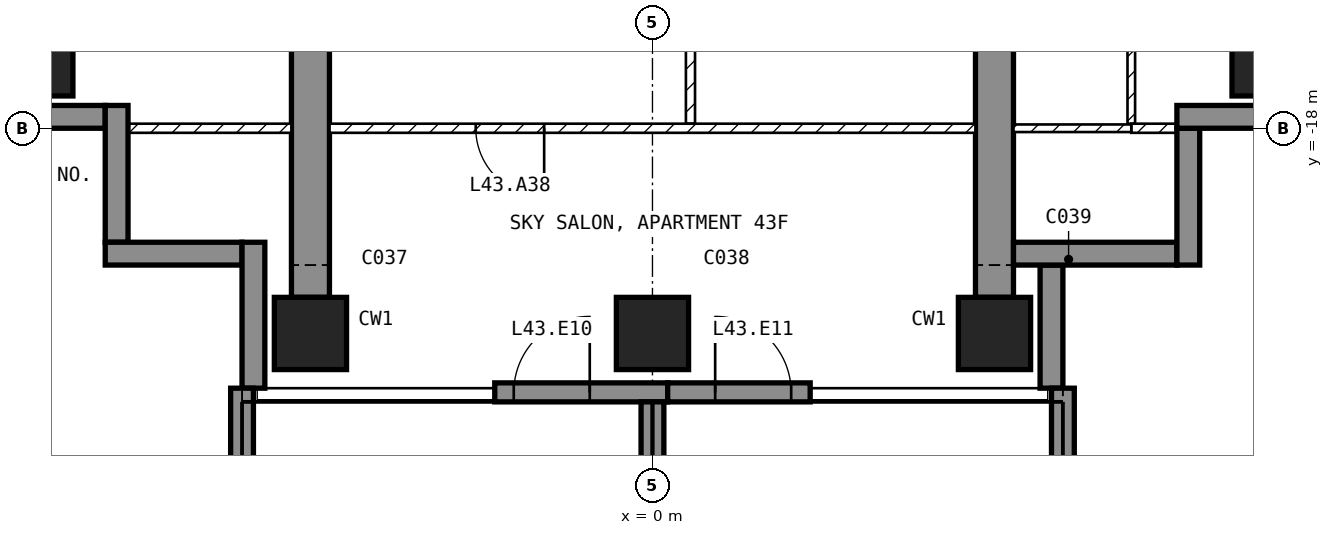
"""IFC4 building model, lengths in metres.
Left out: names, types, materials, properties, quantities, classifications, styles, units other than length and angle.
Written with IfcOpenShell. Run it as: python <this file> out.ifc"""

import sys

from ifc_helpers import new_model, si_unit, direction, frame, frame_2d, origin, origin_2d, place, context, subcontext, project, spatial, polyline, rectangle, outline, extrude, element, fill, save


model = new_model("IFC4")
c1 = context("Model", 3, precision=1e-05, world=origin(), true_north=direction((0.0, 1.0)))
c2 = subcontext(c1, "Body", "Model", "MODEL_VIEW")
j1 = project(units=[si_unit("LENGTHUNIT", "METRE"), si_unit("PLANEANGLEUNIT", "RADIAN")], contexts=[c1])
p1 = place(None, origin())
s1 = spatial("IfcSite", under=j1, at=p1, CompositionType="ELEMENT")
p2 = place(p1, origin())
s2 = spatial("IfcBuilding", under=s1, at=p2, CompositionType="ELEMENT")
p3 = place(p2, frame((0.0, 0.0, 177.1)))
s3 = spatial("IfcBuildingStorey", under=s2, at=p3, CompositionType="ELEMENT", Elevation=177.1)
for number, where, z_axis, x_axis in (
    (1, (-8.1, -17.1, -0.25), (0.0, 0.0, 1.0), (1.0, 0.0, 0.0)),
    (2, (-4.5, -20.7, -0.25), (0.0, 0.0, 1.0), (1.0, 0.0, 0.0)),
    (3, (0.0, -20.7, -0.25), (0.0, 0.0, 1.0), (1.0, 0.0, 0.0)),
    (4, (4.5, -20.7, -0.25), (0.0, 0.0, 1.0), (1.0, 0.0, 0.0)),
    (5, (8.1, -17.1, -0.25), (0.0, 0.0, 1.0), (1.0, 0.0, 0.0)),
):
    element("IfcColumn", number, at=place(p3, frame(where, z_axis=z_axis, x_axis=x_axis)), inside=s3, PredefinedType="COLUMN", context=c2, shape_type="SweptSolid", body=[
        extrude(rectangle(XDim=0.95, YDim=0.95, at=origin_2d()), origin(), (0.0, 0.0, 1.0), 3.5),
    ])
for number, where, z_axis, x_axis in (
    (6, (-4.75, -20.225, -0.25), (1.0, 0.0, 0.0), (0.0, 1.0, 0.0)),
    (7, (4.25, -20.225, -0.25), (1.0, 0.0, 0.0), (0.0, 1.0, 0.0)),
):
    element("IfcWall", number, at=place(p3, frame(where, z_axis=z_axis, x_axis=x_axis)), inside=s3, PredefinedType="SHEAR", context=c2, shape_type="SweptSolid", body=[
        extrude(outline(polyline([(0.0, 0.0), (6.725, 0.0), (6.725, 2.65), (9.125, 2.65), (9.125, 0.0), (11.225, 0.0), (11.225, 3.5), (0.0, 3.5), (0.0, 0.0)])), origin(), (0.0, 0.0, 1.0), 0.5),
    ])
p4 = place(p3, frame((-2.075, -21.475, 0.0), z_axis=(0.0, 0.0, 1.0), x_axis=(1.0, 0.0, 0.0)))
e8 = element("IfcWall", 8, at=p4, inside=s3, PredefinedType="SOLIDWALL", context=c2, shape_type="SweptSolid", body=[
    extrude(rectangle(XDim=2.275, YDim=0.25, at=frame_2d((1.137, 0.0))), origin(), (0.0, 0.0, 1.0), 3.25),
])
p5 = place(p4, frame((0.25, 0.0, 0.0)))
e9 = element("IfcOpeningElement", 9, at=p5, cuts=e8, PredefinedType="OPENING", context=c2, shape_type="SweptSolid", body=[
    extrude(rectangle(XDim=1.0, YDim=2.4, at=frame_2d((0.5, 1.2))), frame((0.0, 0.135, 0.0), z_axis=(0.0, -1.0, 0.0), x_axis=(1.0, 0.0, 0.0)), (0.0, 0.0, 1.0), 0.27),
])
p6 = place(p3, frame((0.2, -21.475, 0.0), z_axis=(0.0, 0.0, 1.0), x_axis=(1.0, 0.0, 0.0)))
e10 = element("IfcWall", 10, at=p6, inside=s3, PredefinedType="SOLIDWALL", context=c2, shape_type="SweptSolid", body=[
    extrude(rectangle(XDim=1.875, YDim=0.25, at=frame_2d((0.938, 0.0))), origin(), (0.0, 0.0, 1.0), 3.25),
])
p7 = place(p6, frame((0.625, 0.0, 0.0)))
e11 = element("IfcOpeningElement", 11, at=p7, cuts=e10, PredefinedType="OPENING", context=c2, shape_type="SweptSolid", body=[
    extrude(rectangle(XDim=1.0, YDim=2.4, at=frame_2d((0.5, 1.2))), frame((0.0, 0.135, 0.0), z_axis=(0.0, -1.0, 0.0), x_axis=(1.0, 0.0, 0.0)), (0.0, 0.0, 1.0), 0.27),
])
p8 = place(p3, frame((5.25, -21.42, 0.0), z_axis=(0.0, 0.0, 1.0), x_axis=(0.0, 1.0, 0.0)))
e12 = element("IfcWall", 12, at=p8, inside=s3, PredefinedType="SOLIDWALL", context=c2, shape_type="SweptSolid", body=[
    extrude(rectangle(XDim=1.62, YDim=0.3, at=frame_2d((0.81, 0.0))), origin(), (0.0, 0.0, 1.0), 3.25),
])
p9 = place(p3, frame((4.75, -19.65, 0.0), z_axis=(0.0, 0.0, 1.0), x_axis=(1.0, 0.0, 0.0)))
e13 = element("IfcWall", 13, at=p9, inside=s3, PredefinedType="SOLIDWALL", context=c2, shape_type="SweptSolid", body=[
    extrude(rectangle(XDim=2.15, YDim=0.3, at=frame_2d((1.075, 0.0))), origin(), (0.0, 0.0, 1.0), 3.25),
])
p10 = place(p3, frame((7.05, -19.8, 0.0), z_axis=(0.0, 0.0, 1.0), x_axis=(0.0, 1.0, 0.0)))
e14 = element("IfcWall", 14, at=p10, inside=s3, PredefinedType="SOLIDWALL", context=c2, shape_type="SweptSolid", body=[
    extrude(rectangle(XDim=1.8, YDim=0.3, at=frame_2d((0.9, 0.0))), origin(), (0.0, 0.0, 1.0), 3.25),
])
p11 = place(p3, frame((6.9, -17.85, 0.0), z_axis=(0.0, 0.0, 1.0), x_axis=(1.0, 0.0, 0.0)))
e15 = element("IfcWall", 15, at=p11, inside=s3, PredefinedType="SOLIDWALL", context=c2, shape_type="SweptSolid", body=[
    extrude(rectangle(XDim=1.85, YDim=0.3, at=frame_2d((0.925, 0.0))), origin(), (0.0, 0.0, 1.0), 3.25),
])
p12 = place(p3, frame((-8.75, -17.85, 0.0), z_axis=(0.0, 0.0, 1.0), x_axis=(1.0, 0.0, 0.0)))
e16 = element("IfcWall", 16, at=p12, inside=s3, PredefinedType="SOLIDWALL", context=c2, shape_type="SweptSolid", body=[
    extrude(rectangle(XDim=1.55, YDim=0.3, at=frame_2d((0.775, 0.0))), origin(), (0.0, 0.0, 1.0), 3.25),
])
for number, where, z_axis, x_axis in (
    (17, (-7.05, -17.7, 0.0), (0.0, 0.0, 1.0), (0.0, -1.0, 0.0)),
    (18, (-7.2, -19.65, 0.0), (0.0, 0.0, 1.0), (1.0, 0.0, 0.0)),
):
    element("IfcWall", number, at=place(p3, frame(where, z_axis=z_axis, x_axis=x_axis)), inside=s3, PredefinedType="SOLIDWALL", context=c2, shape_type="SweptSolid", body=[
        extrude(rectangle(XDim=1.8, YDim=0.3, at=frame_2d((0.9, 0.0))), origin(), (0.0, 0.0, 1.0), 3.25),
    ])
p13 = place(p3, frame((-5.25, -19.5, 0.0), z_axis=(0.0, 0.0, 1.0), x_axis=(0.0, -1.0, 0.0)))
e19 = element("IfcWall", 19, at=p13, inside=s3, PredefinedType="SOLIDWALL", context=c2, shape_type="SweptSolid", body=[
    extrude(rectangle(XDim=1.92, YDim=0.3, at=frame_2d((0.96, 0.0))), origin(), (0.0, 0.0, 1.0), 3.25),
])
p14 = place(p3, frame((-5.4, -21.42, 0.0), z_axis=(0.0, 0.0, 1.0), x_axis=(0.0, -1.0, 0.0)))
e20 = element("IfcWall", 20, at=p14, inside=s3, PredefinedType="SOLIDWALL", context=c2, shape_type="SweptSolid", body=[
    extrude(rectangle(XDim=2.88, YDim=0.3, at=frame_2d((1.44, 0.0))), origin(), (0.0, 0.0, 1.0), 3.25),
])
p15 = place(p3, frame((0.0, -21.6, 0.0), z_axis=(0.0, 0.0, 1.0), x_axis=(0.0, -1.0, 0.0)))
e21 = element("IfcWall", 21, at=p15, inside=s3, PredefinedType="SOLIDWALL", context=c2, shape_type="SweptSolid", body=[
    extrude(rectangle(XDim=2.7, YDim=0.3, at=frame_2d((1.35, 0.0))), origin(), (0.0, 0.0, 1.0), 3.25),
])
p16 = place(p3, frame((5.4, -21.42, 0.0), z_axis=(0.0, 0.0, 1.0), x_axis=(0.0, -1.0, 0.0)))
e22 = element("IfcWall", 22, at=p16, inside=s3, PredefinedType="SOLIDWALL", context=c2, shape_type="SweptSolid", body=[
    extrude(rectangle(XDim=2.88, YDim=0.3, at=frame_2d((1.44, 0.0))), origin(), (0.0, 0.0, 1.0), 3.25),
])
p17 = place(p3, frame((0.5, -15.06, 0.0), z_axis=(0.0, 0.0, 1.0), x_axis=(0.0, -1.0, 0.0)))
e23 = element("IfcWall", 23, at=p17, inside=s3, PredefinedType="PARTITIONING", context=c2, shape_type="SweptSolid", body=[
    extrude(rectangle(XDim=2.88, YDim=0.12, at=frame_2d((1.44, 0.0))), origin(), (0.0, 0.0, 1.0), 3.25),
])
p18 = place(p3, frame((4.25, -18.0, 0.0), z_axis=(0.0, 0.0, 1.0), x_axis=(-1.0, 0.0, 0.0)))
e24 = element("IfcWall", 24, at=p18, inside=s3, PredefinedType="PARTITIONING", context=c2, shape_type="SweptSolid", body=[
    extrude(rectangle(XDim=8.5, YDim=0.12, at=frame_2d((4.25, 0.0))), origin(), (0.0, 0.0, 1.0), 3.25),
])
p19 = place(p18, frame((5.675, 0.0, 0.0)))
e25 = element("IfcOpeningElement", 25, at=p19, cuts=e24, PredefinedType="OPENING", context=c2, shape_type="SweptSolid", body=[
    extrude(rectangle(XDim=0.9, YDim=2.1, at=frame_2d((0.45, 1.05))), frame((0.0, 0.07, 0.0), z_axis=(0.0, -1.0, 0.0), x_axis=(1.0, 0.0, 0.0)), (0.0, 0.0, 1.0), 0.14),
])
p20 = place(p3, frame((6.3, -17.94, 0.0), z_axis=(0.0, 0.0, 1.0), x_axis=(0.0, 1.0, 0.0)))
e26 = element("IfcWall", 26, at=p20, inside=s3, PredefinedType="PARTITIONING", context=c2, shape_type="SweptSolid", body=[
    extrude(rectangle(XDim=3.49, YDim=0.1, at=frame_2d((1.745, 0.0))), origin(), (0.0, 0.0, 1.0), 3.25),
])
p21 = place(p20, frame((1.32, 0.0, 0.0)))
e27 = element("IfcOpeningElement", 27, at=p21, cuts=e26, PredefinedType="OPENING", context=c2, shape_type="SweptSolid", body=[
    extrude(rectangle(XDim=0.85, YDim=2.1, at=frame_2d((0.425, 1.05))), frame((0.0, 0.06, 0.0), z_axis=(0.0, -1.0, 0.0), x_axis=(1.0, 0.0, 0.0)), (0.0, 0.0, 1.0), 0.12),
])
p22 = place(p3, frame((7.12, -18.0, 0.0), z_axis=(0.0, 0.0, 1.0), x_axis=(-1.0, 0.0, 0.0)))
e28 = element("IfcWall", 28, at=p22, inside=s3, PredefinedType="PARTITIONING", context=c2, shape_type="SweptSolid", body=[
    extrude(rectangle(XDim=0.82, YDim=0.12, at=frame_2d((0.41, 0.0))), origin(), (0.0, 0.0, 1.0), 3.25),
])
p23 = place(p3, frame((6.3, -18.0, 0.0), z_axis=(0.0, 0.0, 1.0), x_axis=(-1.0, 0.0, 0.0)))
e29 = element("IfcWall", 29, at=p23, inside=s3, PredefinedType="PARTITIONING", context=c2, shape_type="SweptSolid", body=[
    extrude(rectangle(XDim=1.55, YDim=0.1, at=frame_2d((0.775, 0.0))), origin(), (0.0, 0.0, 1.0), 3.25),
])
p24 = place(p3, frame((-4.75, -18.0, 0.0), z_axis=(0.0, 0.0, 1.0), x_axis=(-1.0, 0.0, 0.0)))
e30 = element("IfcWall", 30, at=p24, inside=s3, PredefinedType="PARTITIONING", context=c2, shape_type="SweptSolid", body=[
    extrude(rectangle(XDim=2.37, YDim=0.12, at=frame_2d((1.185, 0.0))), origin(), (0.0, 0.0, 1.0), 3.25),
])
p25 = place(p5, origin())
e31 = element("IfcDoor", 31, at=p25, inside=s3, OperationType="SINGLE_SWING_RIGHT", PredefinedType="DOOR", context=c2, shape_type="SweptSolid", body=[
    extrude(rectangle(XDim=1.0, YDim=2.4, at=frame_2d((0.5, 1.2))), frame((0.0, 0.025, 0.0), z_axis=(0.0, -1.0, 0.0), x_axis=(1.0, 0.0, 0.0)), (0.0, 0.0, 1.0), 0.05),
])
fill(e9, e31)
p26 = place(p7, origin())
e32 = element("IfcDoor", 32, at=p26, inside=s3, OperationType="SINGLE_SWING_LEFT", PredefinedType="DOOR", context=c2, shape_type="SweptSolid", body=[
    extrude(rectangle(XDim=1.0, YDim=2.4, at=frame_2d((0.5, 1.2))), frame((0.0, 0.025, 0.0), z_axis=(0.0, -1.0, 0.0), x_axis=(1.0, 0.0, 0.0)), (0.0, 0.0, 1.0), 0.05),
])
fill(e11, e32)
p27 = place(p19, origin())
e33 = element("IfcDoor", 33, at=p27, inside=s3, OperationType="SINGLE_SWING_LEFT", PredefinedType="DOOR", context=c2, shape_type="SweptSolid", body=[
    extrude(rectangle(XDim=0.9, YDim=2.1, at=frame_2d((0.45, 1.05))), frame((0.0, 0.025, 0.0), z_axis=(0.0, -1.0, 0.0), x_axis=(1.0, 0.0, 0.0)), (0.0, 0.0, 1.0), 0.05),
])
fill(e25, e33)
save(model, sys.argv[1])
